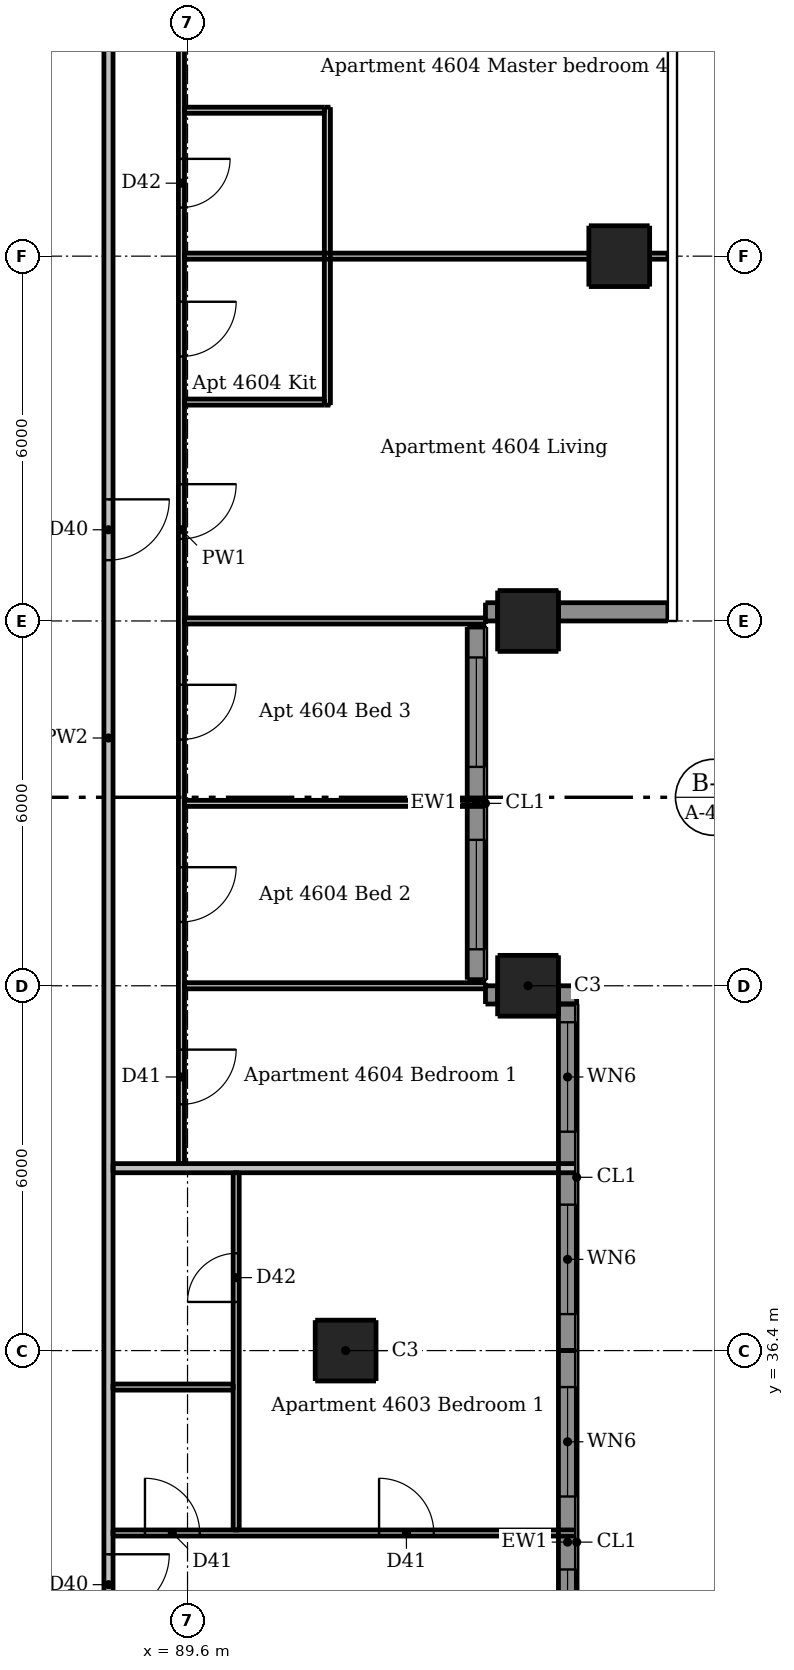
"""IFC4 building model, lengths in metres.
Left out: names, types, materials, properties, quantities, classifications, styles, units other than length and angle.
Written with IfcOpenShell. Run it as: python <this file> out.ifc"""

import sys

from ifc_helpers import new_model, si_unit, direction, frame, frame_2d, origin, origin_2d, place, context, subcontext, project, spatial, rectangle, extrude, element, fill, save


model = new_model("IFC4")
c1 = context("Model", 3, precision=1e-05, world=origin(), true_north=direction((0.0, 1.0)))
c2 = subcontext(c1, "Body", "Model", "MODEL_VIEW")
j1 = project(units=[si_unit("LENGTHUNIT", "METRE"), si_unit("PLANEANGLEUNIT", "RADIAN")], contexts=[c1])
p1 = place(None, origin())
s1 = spatial("IfcSite", under=j1, at=p1, CompositionType="ELEMENT")
p2 = place(p1, origin())
s2 = spatial("IfcBuilding", under=s1, at=p2, CompositionType="ELEMENT")
p3 = place(p2, frame((0.0, 0.0, 171.4)))
s3 = spatial("IfcBuildingStorey", under=s2, at=p3, CompositionType="ELEMENT", Elevation=171.4)
for number, where, z_axis, x_axis in (
    (1, (92.2, 36.4, 0.0), (0.0, 0.0, 1.0), (1.0, 0.0, 0.0)),
    (2, (95.2, 42.4, 0.0), (0.0, 0.0, 1.0), (1.0, 0.0, 0.0)),
    (3, (95.2, 48.4, 0.0), (0.0, 0.0, 1.0), (1.0, 0.0, 0.0)),
    (4, (96.7, 54.4, 0.0), (0.0, 0.0, 1.0), (1.0, 0.0, 0.0)),
):
    element("IfcColumn", number, at=place(p3, frame(where, z_axis=z_axis, x_axis=x_axis)), inside=s3, PredefinedType="COLUMN", context=c2, shape_type="SweptSolid", body=[
        extrude(rectangle(XDim=1.0, YDim=1.0, at=origin_2d()), origin(), (0.0, 0.0, 1.0), 3.05),
    ])
p4 = place(p3, frame((96.0, 42.25, 0.0), z_axis=(0.0, 0.0, 1.0), x_axis=(-1.0, 0.0, 0.0)))
e5 = element("IfcWall", 5, at=p4, inside=s3, PredefinedType="SOLIDWALL", context=c2, shape_type="SweptSolid", body=[
    extrude(rectangle(XDim=0.3, YDim=0.3, at=frame_2d((0.15, 0.0))), origin(), (0.0, 0.0, 1.0), 3.05),
])
for number, where, z_axis, x_axis in (
    (6, (94.7, 42.25, 0.0), (0.0, 0.0, 1.0), (-1.0, 0.0, 0.0)),
    (7, (94.5, 48.55, 0.0), (0.0, 0.0, 1.0), (1.0, 0.0, 0.0)),
):
    element("IfcWall", number, at=place(p3, frame(where, z_axis=z_axis, x_axis=x_axis)), inside=s3, PredefinedType="SOLIDWALL", context=c2, shape_type="SweptSolid", body=[
        extrude(rectangle(XDim=0.2, YDim=0.3, at=frame_2d((0.1, 0.0))), origin(), (0.0, 0.0, 1.0), 3.05),
    ])
p5 = place(p3, frame((95.7, 48.55, 0.0), z_axis=(0.0, 0.0, 1.0), x_axis=(1.0, 0.0, 0.0)))
e8 = element("IfcWall", 8, at=p5, inside=s3, PredefinedType="SOLIDWALL", context=c2, shape_type="SweptSolid", body=[
    extrude(rectangle(XDim=1.8, YDim=0.3, at=frame_2d((0.9, 0.0))), origin(), (0.0, 0.0, 1.0), 3.05),
])
p6 = place(p3, frame((95.85, 30.1, 0.0), z_axis=(0.0, 0.0, 1.0), x_axis=(0.0, 1.0, 0.0)))
e9 = element("IfcWall", 9, at=p6, inside=s3, PredefinedType="SOLIDWALL", context=c2, shape_type="SweptSolid", body=[
    extrude(rectangle(XDim=6.3, YDim=0.3, at=frame_2d((3.15, 0.0))), origin(), (0.0, 0.0, 1.0), 3.05),
])
p7 = place(p6, frame((0.9, 0.0, 0.15)))
e10 = element("IfcOpeningElement", 10, at=p7, cuts=e9, PredefinedType="OPENING", context=c2, shape_type="SweptSolid", body=[
    extrude(rectangle(XDim=1.8, YDim=2.1, at=frame_2d((0.9, 1.05))), frame((0.0, 0.16, 0.0), z_axis=(0.0, -1.0, 0.0), x_axis=(1.0, 0.0, 0.0)), (0.0, 0.0, 1.0), 0.32),
])
p8 = place(p6, frame((3.9, 0.0, 0.15)))
e11 = element("IfcOpeningElement", 11, at=p8, cuts=e9, PredefinedType="OPENING", context=c2, shape_type="SweptSolid", body=[
    extrude(rectangle(XDim=1.8, YDim=2.1, at=frame_2d((0.9, 1.05))), frame((0.0, 0.16, 0.0), z_axis=(0.0, -1.0, 0.0), x_axis=(1.0, 0.0, 0.0)), (0.0, 0.0, 1.0), 0.32),
])
p9 = place(p3, frame((95.85, 36.4, 0.0), z_axis=(0.0, 0.0, 1.0), x_axis=(0.0, 1.0, 0.0)))
e12 = element("IfcWall", 12, at=p9, inside=s3, PredefinedType="SOLIDWALL", context=c2, shape_type="SweptSolid", body=[
    extrude(rectangle(XDim=5.7, YDim=0.3, at=frame_2d((2.85, 0.0))), origin(), (0.0, 0.0, 1.0), 3.05),
])
p10 = place(p9, frame((0.6, 0.0, 0.15)))
e13 = element("IfcOpeningElement", 13, at=p10, cuts=e12, PredefinedType="OPENING", context=c2, shape_type="SweptSolid", body=[
    extrude(rectangle(XDim=1.8, YDim=2.1, at=frame_2d((0.9, 1.05))), frame((0.0, 0.16, 0.0), z_axis=(0.0, -1.0, 0.0), x_axis=(1.0, 0.0, 0.0)), (0.0, 0.0, 1.0), 0.32),
])
p11 = place(p9, frame((3.6, 0.0, 0.15)))
e14 = element("IfcOpeningElement", 14, at=p11, cuts=e12, PredefinedType="OPENING", context=c2, shape_type="SweptSolid", body=[
    extrude(rectangle(XDim=1.8, YDim=2.1, at=frame_2d((0.9, 1.05))), frame((0.0, 0.16, 0.0), z_axis=(0.0, -1.0, 0.0), x_axis=(1.0, 0.0, 0.0)), (0.0, 0.0, 1.0), 0.32),
])
p12 = place(p3, frame((94.35, 42.5, 0.0), z_axis=(0.0, 0.0, 1.0), x_axis=(0.0, 1.0, 0.0)))
e15 = element("IfcWall", 15, at=p12, inside=s3, PredefinedType="SOLIDWALL", context=c2, shape_type="SweptSolid", body=[
    extrude(rectangle(XDim=5.8, YDim=0.3, at=frame_2d((2.9, 0.0))), origin(), (0.0, 0.0, 1.0), 3.05),
])
p13 = place(p12, frame((0.5, 0.0, 0.15)))
e16 = element("IfcOpeningElement", 16, at=p13, cuts=e15, PredefinedType="OPENING", context=c2, shape_type="SweptSolid", body=[
    extrude(rectangle(XDim=1.8, YDim=2.1, at=frame_2d((0.9, 1.05))), frame((0.0, 0.16, 0.0), z_axis=(0.0, -1.0, 0.0), x_axis=(1.0, 0.0, 0.0)), (0.0, 0.0, 1.0), 0.32),
])
p14 = place(p12, frame((3.5, 0.0, 0.15)))
e17 = element("IfcOpeningElement", 17, at=p14, cuts=e15, PredefinedType="OPENING", context=c2, shape_type="SweptSolid", body=[
    extrude(rectangle(XDim=1.8, YDim=2.1, at=frame_2d((0.9, 1.05))), frame((0.0, 0.16, 0.0), z_axis=(0.0, -1.0, 0.0), x_axis=(1.0, 0.0, 0.0)), (0.0, 0.0, 1.0), 0.32),
])
p15 = place(p3, frame((89.5, 60.325, 0.0), z_axis=(0.0, 0.0, 1.0), x_axis=(0.0, -1.0, 0.0)))
e18 = element("IfcWall", 18, at=p15, inside=s3, PredefinedType="PARTITIONING", context=c2, shape_type="SweptSolid", body=[
    extrude(rectangle(XDim=20.85, YDim=0.1, at=frame_2d((10.425, 0.0))), origin(), (0.0, 0.0, 1.0), 2.51),
])
p16 = place(p15, frame((9.675, 0.0, 0.0)))
e19 = element("IfcOpeningElement", 19, at=p16, cuts=e18, PredefinedType="OPENING", context=c2, shape_type="SweptSolid", body=[
    extrude(rectangle(XDim=0.9, YDim=2.1, at=frame_2d((0.45, 1.05))), frame((0.0, 0.06, 0.0), z_axis=(0.0, -1.0, 0.0), x_axis=(1.0, 0.0, 0.0)), (0.0, 0.0, 1.0), 0.12),
])
p17 = place(p15, frame((6.675, 0.0, 0.0)))
e20 = element("IfcOpeningElement", 20, at=p17, cuts=e18, PredefinedType="OPENING", context=c2, shape_type="SweptSolid", body=[
    extrude(rectangle(XDim=0.9, YDim=2.1, at=frame_2d((0.45, 1.05))), frame((0.0, 0.06, 0.0), z_axis=(0.0, -1.0, 0.0), x_axis=(1.0, 0.0, 0.0)), (0.0, 0.0, 1.0), 0.12),
])
p18 = place(p15, frame((18.975, 0.0, 0.0)))
e21 = element("IfcOpeningElement", 21, at=p18, cuts=e18, PredefinedType="OPENING", context=c2, shape_type="SweptSolid", body=[
    extrude(rectangle(XDim=0.9, YDim=2.1, at=frame_2d((0.45, 1.05))), frame((0.0, 0.06, 0.0), z_axis=(0.0, -1.0, 0.0), x_axis=(1.0, 0.0, 0.0)), (0.0, 0.0, 1.0), 0.12),
])
p19 = place(p15, frame((15.975, 0.0, 0.0)))
e22 = element("IfcOpeningElement", 22, at=p19, cuts=e18, PredefinedType="OPENING", context=c2, shape_type="SweptSolid", body=[
    extrude(rectangle(XDim=0.9, YDim=2.1, at=frame_2d((0.45, 1.05))), frame((0.0, 0.06, 0.0), z_axis=(0.0, -1.0, 0.0), x_axis=(1.0, 0.0, 0.0)), (0.0, 0.0, 1.0), 0.12),
])
p20 = place(p15, frame((12.975, 0.0, 0.0)))
e23 = element("IfcOpeningElement", 23, at=p20, cuts=e18, PredefinedType="OPENING", context=c2, shape_type="SweptSolid", body=[
    extrude(rectangle(XDim=0.9, YDim=2.1, at=frame_2d((0.45, 1.05))), frame((0.0, 0.06, 0.0), z_axis=(0.0, -1.0, 0.0), x_axis=(1.0, 0.0, 0.0)), (0.0, 0.0, 1.0), 0.12),
])
p21 = place(p15, frame((1.275, 0.0, 0.0)))
e24 = element("IfcOpeningElement", 24, at=p21, cuts=e18, PredefinedType="OPENING", context=c2, shape_type="SweptSolid", body=[
    extrude(rectangle(XDim=0.9, YDim=2.1, at=frame_2d((0.45, 1.05))), frame((0.0, 0.06, 0.0), z_axis=(0.0, -1.0, 0.0), x_axis=(1.0, 0.0, 0.0)), (0.0, 0.0, 1.0), 0.12),
])
p22 = place(p15, frame((4.325, 0.0, 0.0)))
e25 = element("IfcOpeningElement", 25, at=p22, cuts=e18, PredefinedType="OPENING", context=c2, shape_type="SweptSolid", body=[
    extrude(rectangle(XDim=0.8, YDim=2.1, at=frame_2d((0.4, 1.05))), frame((0.0, 0.06, 0.0), z_axis=(0.0, -1.0, 0.0), x_axis=(1.0, 0.0, 0.0)), (0.0, 0.0, 1.0), 0.12),
])
p23 = place(p3, frame((90.4, 33.45, 0.0), z_axis=(0.0, 0.0, 1.0), x_axis=(0.0, 1.0, 0.0)))
e26 = element("IfcWall", 26, at=p23, inside=s3, PredefinedType="PARTITIONING", context=c2, shape_type="SweptSolid", body=[
    extrude(rectangle(XDim=5.875, YDim=0.1, at=frame_2d((2.938, 0.0))), origin(), (0.0, 0.0, 1.0), 3.05),
])
p24 = place(p23, frame((3.75, 0.0, 0.0)))
e27 = element("IfcOpeningElement", 27, at=p24, cuts=e26, PredefinedType="OPENING", context=c2, shape_type="SweptSolid", body=[
    extrude(rectangle(XDim=0.8, YDim=2.1, at=frame_2d((0.4, 1.05))), frame((0.0, 0.06, 0.0), z_axis=(0.0, -1.0, 0.0), x_axis=(1.0, 0.0, 0.0)), (0.0, 0.0, 1.0), 0.12),
])
p25 = place(p3, frame((91.9, 51.95, 0.0), z_axis=(0.0, 0.0, 1.0), x_axis=(0.0, 1.0, 0.0)))
e28 = element("IfcWall", 28, at=p25, inside=s3, PredefinedType="PARTITIONING", context=c2, shape_type="SweptSolid", body=[
    extrude(rectangle(XDim=4.9, YDim=0.1, at=frame_2d((2.45, 0.0))), origin(), (0.0, 0.0, 1.0), 3.05),
])
p26 = place(p3, frame((89.55, 56.8, 0.0), z_axis=(0.0, 0.0, 1.0), x_axis=(1.0, 0.0, 0.0)))
e29 = element("IfcWall", 29, at=p26, inside=s3, PredefinedType="PARTITIONING", context=c2, shape_type="SweptSolid", body=[
    extrude(rectangle(XDim=2.3, YDim=0.1, at=frame_2d((1.15, 0.0))), origin(), (0.0, 0.0, 1.0), 3.05),
])
p27 = place(p3, frame((89.55, 54.4, 0.0), z_axis=(0.0, 0.0, 1.0), x_axis=(1.0, 0.0, 0.0)))
e30 = element("IfcWall", 30, at=p27, inside=s3, PredefinedType="PARTITIONING", context=c2, shape_type="SweptSolid", body=[
    extrude(rectangle(XDim=7.95, YDim=0.1, at=frame_2d((3.975, 0.0))), origin(), (0.0, 0.0, 1.0), 2.516),
])
p28 = place(p3, frame((89.55, 52.0, 0.0), z_axis=(0.0, 0.0, 1.0), x_axis=(1.0, 0.0, 0.0)))
e31 = element("IfcWall", 31, at=p28, inside=s3, PredefinedType="PARTITIONING", context=c2, shape_type="SweptSolid", body=[
    extrude(rectangle(XDim=2.3, YDim=0.1, at=frame_2d((1.15, 0.0))), origin(), (0.0, 0.0, 1.0), 3.05),
])
p29 = place(p3, frame((89.55, 48.4, 0.0), z_axis=(0.0, 0.0, 1.0), x_axis=(1.0, 0.0, 0.0)))
e32 = element("IfcWall", 32, at=p29, inside=s3, PredefinedType="PARTITIONING", context=c2, shape_type="SweptSolid", body=[
    extrude(rectangle(XDim=4.95, YDim=0.1, at=frame_2d((2.475, 0.0))), origin(), (0.0, 0.0, 1.0), 2.59),
])
p30 = place(p3, frame((89.55, 45.4, 0.0), z_axis=(0.0, 0.0, 1.0), x_axis=(1.0, 0.0, 0.0)))
e33 = element("IfcWall", 33, at=p30, inside=s3, PredefinedType="PARTITIONING", context=c2, shape_type="SweptSolid", body=[
    extrude(rectangle(XDim=4.95, YDim=0.1, at=frame_2d((2.475, 0.0))), origin(), (0.0, 0.0, 1.0), 3.05),
])
p31 = place(p3, frame((89.55, 42.4, 0.0), z_axis=(0.0, 0.0, 1.0), x_axis=(1.0, 0.0, 0.0)))
e34 = element("IfcWall", 34, at=p31, inside=s3, PredefinedType="PARTITIONING", context=c2, shape_type="SweptSolid", body=[
    extrude(rectangle(XDim=4.95, YDim=0.1, at=frame_2d((2.475, 0.0))), origin(), (0.0, 0.0, 1.0), 2.59),
])
p32 = place(p3, frame((88.375, 35.8, 0.0), z_axis=(0.0, 0.0, 1.0), x_axis=(1.0, 0.0, 0.0)))
e35 = element("IfcWall", 35, at=p32, inside=s3, PredefinedType="PARTITIONING", context=c2, shape_type="SweptSolid", body=[
    extrude(rectangle(XDim=1.975, YDim=0.1, at=frame_2d((0.988, 0.0))), origin(), (0.0, 0.0, 1.0), 3.05),
])
p33 = place(p3, frame((88.375, 33.4, 0.0), z_axis=(0.0, 0.0, 1.0), x_axis=(1.0, 0.0, 0.0)))
e36 = element("IfcWall", 36, at=p33, inside=s3, PredefinedType="PARTITIONING", context=c2, shape_type="SweptSolid", body=[
    extrude(rectangle(XDim=7.625, YDim=0.1, at=frame_2d((3.812, 0.0))), origin(), (0.0, 0.0, 1.0), 3.05),
])
p34 = place(p33, frame((0.525, 0.0, 0.0)))
e37 = element("IfcOpeningElement", 37, at=p34, cuts=e36, PredefinedType="OPENING", context=c2, shape_type="SweptSolid", body=[
    extrude(rectangle(XDim=0.9, YDim=2.1, at=frame_2d((0.45, 1.05))), frame((0.0, 0.06, 0.0), z_axis=(0.0, -1.0, 0.0), x_axis=(1.0, 0.0, 0.0)), (0.0, 0.0, 1.0), 0.12),
])
p35 = place(p33, frame((4.375, 0.0, 0.0)))
e38 = element("IfcOpeningElement", 38, at=p35, cuts=e36, PredefinedType="OPENING", context=c2, shape_type="SweptSolid", body=[
    extrude(rectangle(XDim=0.9, YDim=2.1, at=frame_2d((0.45, 1.05))), frame((0.0, 0.06, 0.0), z_axis=(0.0, -1.0, 0.0), x_axis=(1.0, 0.0, 0.0)), (0.0, 0.0, 1.0), 0.12),
])
p36 = place(p3, frame((88.3, 61.175, 0.0), z_axis=(0.0, 0.0, 1.0), x_axis=(0.0, -1.0, 0.0)))
e39 = element("IfcWall", 39, at=p36, inside=s3, PredefinedType="PARTITIONING", context=c2, shape_type="SweptSolid", body=[
    extrude(rectangle(XDim=29.4, YDim=0.15, at=frame_2d((14.7, 0.0))), origin(), (0.0, 0.0, 1.0), 3.05),
])
p37 = place(p36, frame((28.125, 0.0, 0.0)))
e40 = element("IfcOpeningElement", 40, at=p37, cuts=e39, PredefinedType="OPENING", context=c2, shape_type="SweptSolid", body=[
    extrude(rectangle(XDim=1.0, YDim=2.1, at=frame_2d((0.5, 1.05))), frame((0.0, 0.085, 0.0), z_axis=(0.0, -1.0, 0.0), x_axis=(1.0, 0.0, 0.0)), (0.0, 0.0, 1.0), 0.17),
])
p38 = place(p36, frame((10.775, 0.0, 0.0)))
e41 = element("IfcOpeningElement", 41, at=p38, cuts=e39, PredefinedType="OPENING", context=c2, shape_type="SweptSolid", body=[
    extrude(rectangle(XDim=1.0, YDim=2.1, at=frame_2d((0.5, 1.05))), frame((0.0, 0.085, 0.0), z_axis=(0.0, -1.0, 0.0), x_axis=(1.0, 0.0, 0.0)), (0.0, 0.0, 1.0), 0.17),
])
p39 = place(p3, frame((88.375, 39.4, 0.0), z_axis=(0.0, 0.0, 1.0), x_axis=(1.0, 0.0, 0.0)))
e42 = element("IfcWall", 42, at=p39, inside=s3, PredefinedType="PARTITIONING", context=c2, shape_type="SweptSolid", body=[
    extrude(rectangle(XDim=7.625, YDim=0.15, at=frame_2d((3.812, 0.0))), origin(), (0.0, 0.0, 1.0), 3.05),
])
p40 = place(p7, origin())
e43 = element("IfcWindow", 43, at=p40, inside=s3, PartitioningType="DOUBLE_PANEL_VERTICAL", PredefinedType="WINDOW", context=c2, shape_type="SweptSolid", body=[
    extrude(rectangle(XDim=1.8, YDim=2.1, at=frame_2d((0.9, 1.05))), frame((0.0, 0.03, 0.0), z_axis=(0.0, -1.0, 0.0), x_axis=(1.0, 0.0, 0.0)), (0.0, 0.0, 1.0), 0.06),
])
fill(e10, e43)
p41 = place(p8, origin())
e44 = element("IfcWindow", 44, at=p41, inside=s3, PartitioningType="DOUBLE_PANEL_VERTICAL", PredefinedType="WINDOW", context=c2, shape_type="SweptSolid", body=[
    extrude(rectangle(XDim=1.8, YDim=2.1, at=frame_2d((0.9, 1.05))), frame((0.0, 0.03, 0.0), z_axis=(0.0, -1.0, 0.0), x_axis=(1.0, 0.0, 0.0)), (0.0, 0.0, 1.0), 0.06),
])
fill(e11, e44)
p42 = place(p10, origin())
e45 = element("IfcWindow", 45, at=p42, inside=s3, PartitioningType="DOUBLE_PANEL_VERTICAL", PredefinedType="WINDOW", context=c2, shape_type="SweptSolid", body=[
    extrude(rectangle(XDim=1.8, YDim=2.1, at=frame_2d((0.9, 1.05))), frame((0.0, 0.03, 0.0), z_axis=(0.0, -1.0, 0.0), x_axis=(1.0, 0.0, 0.0)), (0.0, 0.0, 1.0), 0.06),
])
fill(e13, e45)
p43 = place(p11, origin())
e46 = element("IfcWindow", 46, at=p43, inside=s3, PartitioningType="DOUBLE_PANEL_VERTICAL", PredefinedType="WINDOW", context=c2, shape_type="SweptSolid", body=[
    extrude(rectangle(XDim=1.8, YDim=2.1, at=frame_2d((0.9, 1.05))), frame((0.0, 0.03, 0.0), z_axis=(0.0, -1.0, 0.0), x_axis=(1.0, 0.0, 0.0)), (0.0, 0.0, 1.0), 0.06),
])
fill(e14, e46)
p44 = place(p13, origin())
e47 = element("IfcWindow", 47, at=p44, inside=s3, PartitioningType="DOUBLE_PANEL_VERTICAL", PredefinedType="WINDOW", context=c2, shape_type="SweptSolid", body=[
    extrude(rectangle(XDim=1.8, YDim=2.1, at=frame_2d((0.9, 1.05))), frame((0.0, 0.03, 0.0), z_axis=(0.0, -1.0, 0.0), x_axis=(1.0, 0.0, 0.0)), (0.0, 0.0, 1.0), 0.06),
])
fill(e16, e47)
p45 = place(p14, origin())
e48 = element("IfcWindow", 48, at=p45, inside=s3, PartitioningType="DOUBLE_PANEL_VERTICAL", PredefinedType="WINDOW", context=c2, shape_type="SweptSolid", body=[
    extrude(rectangle(XDim=1.8, YDim=2.1, at=frame_2d((0.9, 1.05))), frame((0.0, 0.03, 0.0), z_axis=(0.0, -1.0, 0.0), x_axis=(1.0, 0.0, 0.0)), (0.0, 0.0, 1.0), 0.06),
])
fill(e17, e48)
p46 = place(p37, origin())
e49 = element("IfcDoor", 49, at=p46, inside=s3, OperationType="SINGLE_SWING_LEFT", PredefinedType="DOOR", context=c2, shape_type="SweptSolid", body=[
    extrude(rectangle(XDim=1.0, YDim=2.1, at=frame_2d((0.5, 1.05))), frame((0.0, 0.025, 0.0), z_axis=(0.0, -1.0, 0.0), x_axis=(1.0, 0.0, 0.0)), (0.0, 0.0, 1.0), 0.05),
])
fill(e40, e49)
p47 = place(p34, origin())
e50 = element("IfcDoor", 50, at=p47, inside=s3, OperationType="SINGLE_SWING_LEFT", PredefinedType="DOOR", context=c2, shape_type="SweptSolid", body=[
    extrude(rectangle(XDim=0.9, YDim=2.1, at=frame_2d((0.45, 1.05))), frame((0.0, 0.025, 0.0), z_axis=(0.0, -1.0, 0.0), x_axis=(1.0, 0.0, 0.0)), (0.0, 0.0, 1.0), 0.05),
])
fill(e37, e50)
p48 = place(p35, origin())
e51 = element("IfcDoor", 51, at=p48, inside=s3, OperationType="SINGLE_SWING_LEFT", PredefinedType="DOOR", context=c2, shape_type="SweptSolid", body=[
    extrude(rectangle(XDim=0.9, YDim=2.1, at=frame_2d((0.45, 1.05))), frame((0.0, 0.025, 0.0), z_axis=(0.0, -1.0, 0.0), x_axis=(1.0, 0.0, 0.0)), (0.0, 0.0, 1.0), 0.05),
])
fill(e38, e51)
p49 = place(p24, origin())
e52 = element("IfcDoor", 52, at=p49, inside=s3, OperationType="SINGLE_SWING_LEFT", PredefinedType="DOOR", context=c2, shape_type="SweptSolid", body=[
    extrude(rectangle(XDim=0.8, YDim=2.1, at=frame_2d((0.4, 1.05))), frame((0.0, 0.025, 0.0), z_axis=(0.0, -1.0, 0.0), x_axis=(1.0, 0.0, 0.0)), (0.0, 0.0, 1.0), 0.05),
])
fill(e27, e52)
p50 = place(p38, origin())
e53 = element("IfcDoor", 53, at=p50, inside=s3, OperationType="SINGLE_SWING_LEFT", PredefinedType="DOOR", context=c2, shape_type="SweptSolid", body=[
    extrude(rectangle(XDim=1.0, YDim=2.1, at=frame_2d((0.5, 1.05))), frame((0.0, 0.025, 0.0), z_axis=(0.0, -1.0, 0.0), x_axis=(1.0, 0.0, 0.0)), (0.0, 0.0, 1.0), 0.05),
])
fill(e41, e53)
p51 = place(p16, origin())
e54 = element("IfcDoor", 54, at=p51, inside=s3, OperationType="SINGLE_SWING_LEFT", PredefinedType="DOOR", context=c2, shape_type="SweptSolid", body=[
    extrude(rectangle(XDim=0.9, YDim=2.1, at=frame_2d((0.45, 1.05))), frame((0.0, 0.025, 0.0), z_axis=(0.0, -1.0, 0.0), x_axis=(1.0, 0.0, 0.0)), (0.0, 0.0, 1.0), 0.05),
])
fill(e19, e54)
p52 = place(p17, origin())
e55 = element("IfcDoor", 55, at=p52, inside=s3, OperationType="SINGLE_SWING_LEFT", PredefinedType="DOOR", context=c2, shape_type="SweptSolid", body=[
    extrude(rectangle(XDim=0.9, YDim=2.1, at=frame_2d((0.45, 1.05))), frame((0.0, 0.025, 0.0), z_axis=(0.0, -1.0, 0.0), x_axis=(1.0, 0.0, 0.0)), (0.0, 0.0, 1.0), 0.05),
])
fill(e20, e55)
p53 = place(p18, origin())
e56 = element("IfcDoor", 56, at=p53, inside=s3, OperationType="SINGLE_SWING_LEFT", PredefinedType="DOOR", context=c2, shape_type="SweptSolid", body=[
    extrude(rectangle(XDim=0.9, YDim=2.1, at=frame_2d((0.45, 1.05))), frame((0.0, 0.025, 0.0), z_axis=(0.0, -1.0, 0.0), x_axis=(1.0, 0.0, 0.0)), (0.0, 0.0, 1.0), 0.05),
])
fill(e21, e56)
p54 = place(p19, origin())
e57 = element("IfcDoor", 57, at=p54, inside=s3, OperationType="SINGLE_SWING_LEFT", PredefinedType="DOOR", context=c2, shape_type="SweptSolid", body=[
    extrude(rectangle(XDim=0.9, YDim=2.1, at=frame_2d((0.45, 1.05))), frame((0.0, 0.025, 0.0), z_axis=(0.0, -1.0, 0.0), x_axis=(1.0, 0.0, 0.0)), (0.0, 0.0, 1.0), 0.05),
])
fill(e22, e57)
p55 = place(p20, origin())
e58 = element("IfcDoor", 58, at=p55, inside=s3, OperationType="SINGLE_SWING_LEFT", PredefinedType="DOOR", context=c2, shape_type="SweptSolid", body=[
    extrude(rectangle(XDim=0.9, YDim=2.1, at=frame_2d((0.45, 1.05))), frame((0.0, 0.025, 0.0), z_axis=(0.0, -1.0, 0.0), x_axis=(1.0, 0.0, 0.0)), (0.0, 0.0, 1.0), 0.05),
])
fill(e23, e58)
p56 = place(p22, origin())
e59 = element("IfcDoor", 59, at=p56, inside=s3, OperationType="SINGLE_SWING_LEFT", PredefinedType="DOOR", context=c2, shape_type="SweptSolid", body=[
    extrude(rectangle(XDim=0.8, YDim=2.1, at=frame_2d((0.4, 1.05))), frame((0.0, 0.025, 0.0), z_axis=(0.0, -1.0, 0.0), x_axis=(1.0, 0.0, 0.0)), (0.0, 0.0, 1.0), 0.05),
])
fill(e25, e59)
save(model, sys.argv[1])
